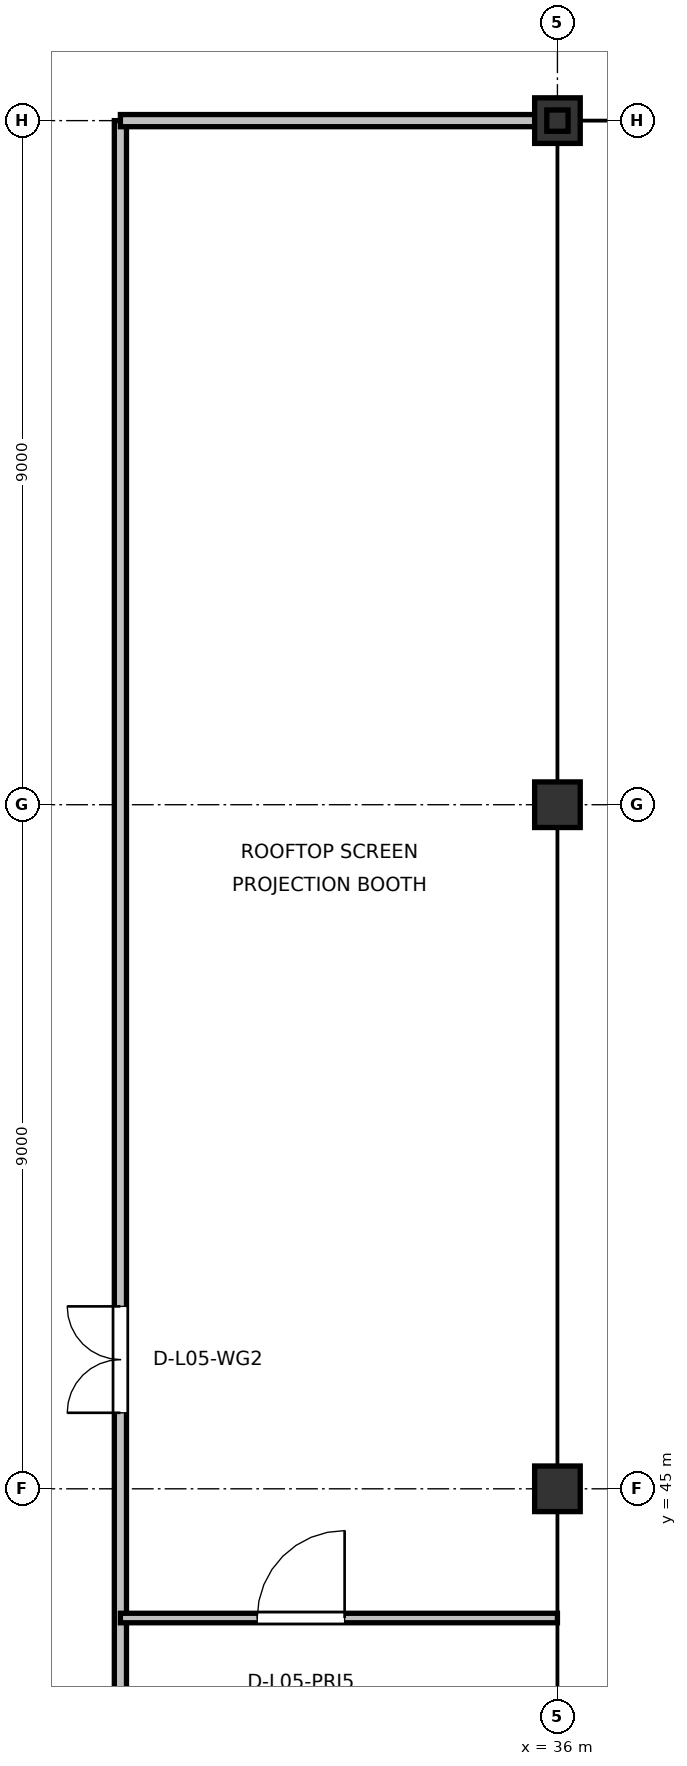
"""IFC4 building model, lengths in metres.
Left out: names, types, materials, properties, quantities, classifications, styles, units other than length and angle.
Written with IfcOpenShell. Run it as: python <this file> out.ifc"""

import sys

from ifc_helpers import new_model, si_unit, direction, frame, frame_2d, origin, origin_2d, place, context, subcontext, project, spatial, rectangle, i_section, extrude, element, fill, save


model = new_model("IFC4")
c1 = context("Model", 3, precision=1e-05, world=origin(), true_north=direction((0.0, 1.0)))
c2 = subcontext(c1, "Body", "Model", "MODEL_VIEW")
j1 = project(units=[si_unit("LENGTHUNIT", "METRE"), si_unit("PLANEANGLEUNIT", "RADIAN")], contexts=[c1])
p1 = place(None, origin())
s1 = spatial("IfcSite", under=j1, at=p1, CompositionType="ELEMENT")
p2 = place(p1, origin())
s2 = spatial("IfcBuilding", under=s1, at=p2, CompositionType="ELEMENT")
p3 = place(p2, frame((0.0, 0.0, 23.4)))
s3 = spatial("IfcBuildingStorey", under=s2, at=p3, CompositionType="ELEMENT", Elevation=23.4)
for number, where, z_axis, x_axis in (
    (1, (36.0, 45.0, 0.0), (0.0, 0.0, 1.0), (1.0, 0.0, 0.0)),
    (2, (36.0, 54.0, 0.0), (0.0, 0.0, 1.0), (1.0, 0.0, 0.0)),
    (3, (36.0, 63.0, 0.0), (0.0, 0.0, 1.0), (1.0, 0.0, 0.0)),
):
    element("IfcColumn", number, at=place(p3, frame(where, z_axis=z_axis, x_axis=x_axis)), inside=s3, PredefinedType="COLUMN", context=c2, shape_type="SweptSolid", body=[
        extrude(rectangle(XDim=0.6, YDim=0.6, at=origin_2d()), origin(), (0.0, 0.0, 1.0), 4.2),
    ])
p4 = place(p3, frame((36.0, 63.0, 4.2), z_axis=(0.0, 0.0, 1.0), x_axis=(1.0, 0.0, 0.0)))
e4 = element("IfcColumn", 4, at=p4, inside=s3, PredefinedType="COLUMN", context=c2, shape_type="SweptSolid", body=[
    extrude(i_section(OverallWidth=0.28, OverallDepth=0.28, WebThickness=0.01, FlangeThickness=0.018, at=origin_2d()), origin(), (0.0, 0.0, 1.0), 2.54),
])
p5 = place(p3, frame((30.25, 21.0, 0.0), z_axis=(0.0, 0.0, 1.0), x_axis=(0.0, 1.0, 0.0)))
e5 = element("IfcWall", 5, at=p5, inside=s3, PredefinedType="PARTITIONING", context=c2, shape_type="SweptSolid", body=[
    extrude(rectangle(XDim=42.0, YDim=0.16, at=frame_2d((21.0, 0.0))), origin(), (0.0, 0.0, 1.0), 3.96),
])
p6 = place(p5, frame((4.5, 0.0, 0.0)))
e6 = element("IfcOpeningElement", 6, at=p6, cuts=e5, PredefinedType="OPENING", context=c2, shape_type="SweptSolid", body=[
    extrude(rectangle(XDim=1.4, YDim=2.2, at=frame_2d((0.7, 1.1))), frame((0.0, 0.09, 0.0), z_axis=(0.0, -1.0, 0.0), x_axis=(1.0, 0.0, 0.0)), (0.0, 0.0, 1.0), 0.18),
])
p7 = place(p5, frame((25.0, 0.0, 0.0)))
e7 = element("IfcOpeningElement", 7, at=p7, cuts=e5, PredefinedType="OPENING", context=c2, shape_type="SweptSolid", body=[
    extrude(rectangle(XDim=1.4, YDim=2.2, at=frame_2d((0.7, 1.1))), frame((0.0, 0.09, 0.0), z_axis=(0.0, -1.0, 0.0), x_axis=(1.0, 0.0, 0.0)), (0.0, 0.0, 1.0), 0.18),
])
p8 = place(p3, frame((30.25, 63.0, 0.0), z_axis=(0.0, 0.0, 1.0), x_axis=(1.0, 0.0, 0.0)))
e8 = element("IfcWall", 8, at=p8, inside=s3, PredefinedType="PARTITIONING", context=c2, shape_type="SweptSolid", body=[
    extrude(rectangle(XDim=5.75, YDim=0.16, at=frame_2d((2.875, 0.0))), origin(), (0.0, 0.0, 1.0), 3.715),
])
p9 = place(p3, frame((30.25, 43.3, 0.0), z_axis=(0.0, 0.0, 1.0), x_axis=(1.0, 0.0, 0.0)))
e9 = element("IfcWall", 9, at=p9, inside=s3, PredefinedType="PARTITIONING", context=c2, shape_type="SweptSolid", body=[
    extrude(rectangle(XDim=5.75, YDim=0.125, at=frame_2d((2.875, 0.0))), origin(), (0.0, 0.0, 1.0), 3.96),
])
p10 = place(p9, frame((1.8, 0.0, 0.0)))
e10 = element("IfcOpeningElement", 10, at=p10, cuts=e9, PredefinedType="OPENING", context=c2, shape_type="SweptSolid", body=[
    extrude(rectangle(XDim=1.15, YDim=2.15, at=frame_2d((0.575, 1.075))), frame((0.0, 0.073, 0.0), z_axis=(0.0, -1.0, 0.0), x_axis=(1.0, 0.0, 0.0)), (0.0, 0.0, 1.0), 0.145),
])
p11 = place(p7, origin())
e11 = element("IfcDoor", 11, at=p11, inside=s3, OperationType="DOUBLE_DOOR_SINGLE_SWING", PredefinedType="DOOR", context=c2, shape_type="SweptSolid", body=[
    extrude(rectangle(XDim=1.4, YDim=2.2, at=frame_2d((0.7, 1.1))), frame((0.0, 0.025, 0.0), z_axis=(0.0, -1.0, 0.0), x_axis=(1.0, 0.0, 0.0)), (0.0, 0.0, 1.0), 0.05),
])
fill(e7, e11)
p12 = place(p10, origin())
e12 = element("IfcDoor", 12, at=p12, inside=s3, OperationType="SINGLE_SWING_RIGHT", PredefinedType="DOOR", context=c2, shape_type="SweptSolid", body=[
    extrude(rectangle(XDim=1.15, YDim=2.15, at=frame_2d((0.575, 1.075))), frame((0.0, 0.025, 0.0), z_axis=(0.0, -1.0, 0.0), x_axis=(1.0, 0.0, 0.0)), (0.0, 0.0, 1.0), 0.05),
])
fill(e10, e12)
save(model, sys.argv[1])
